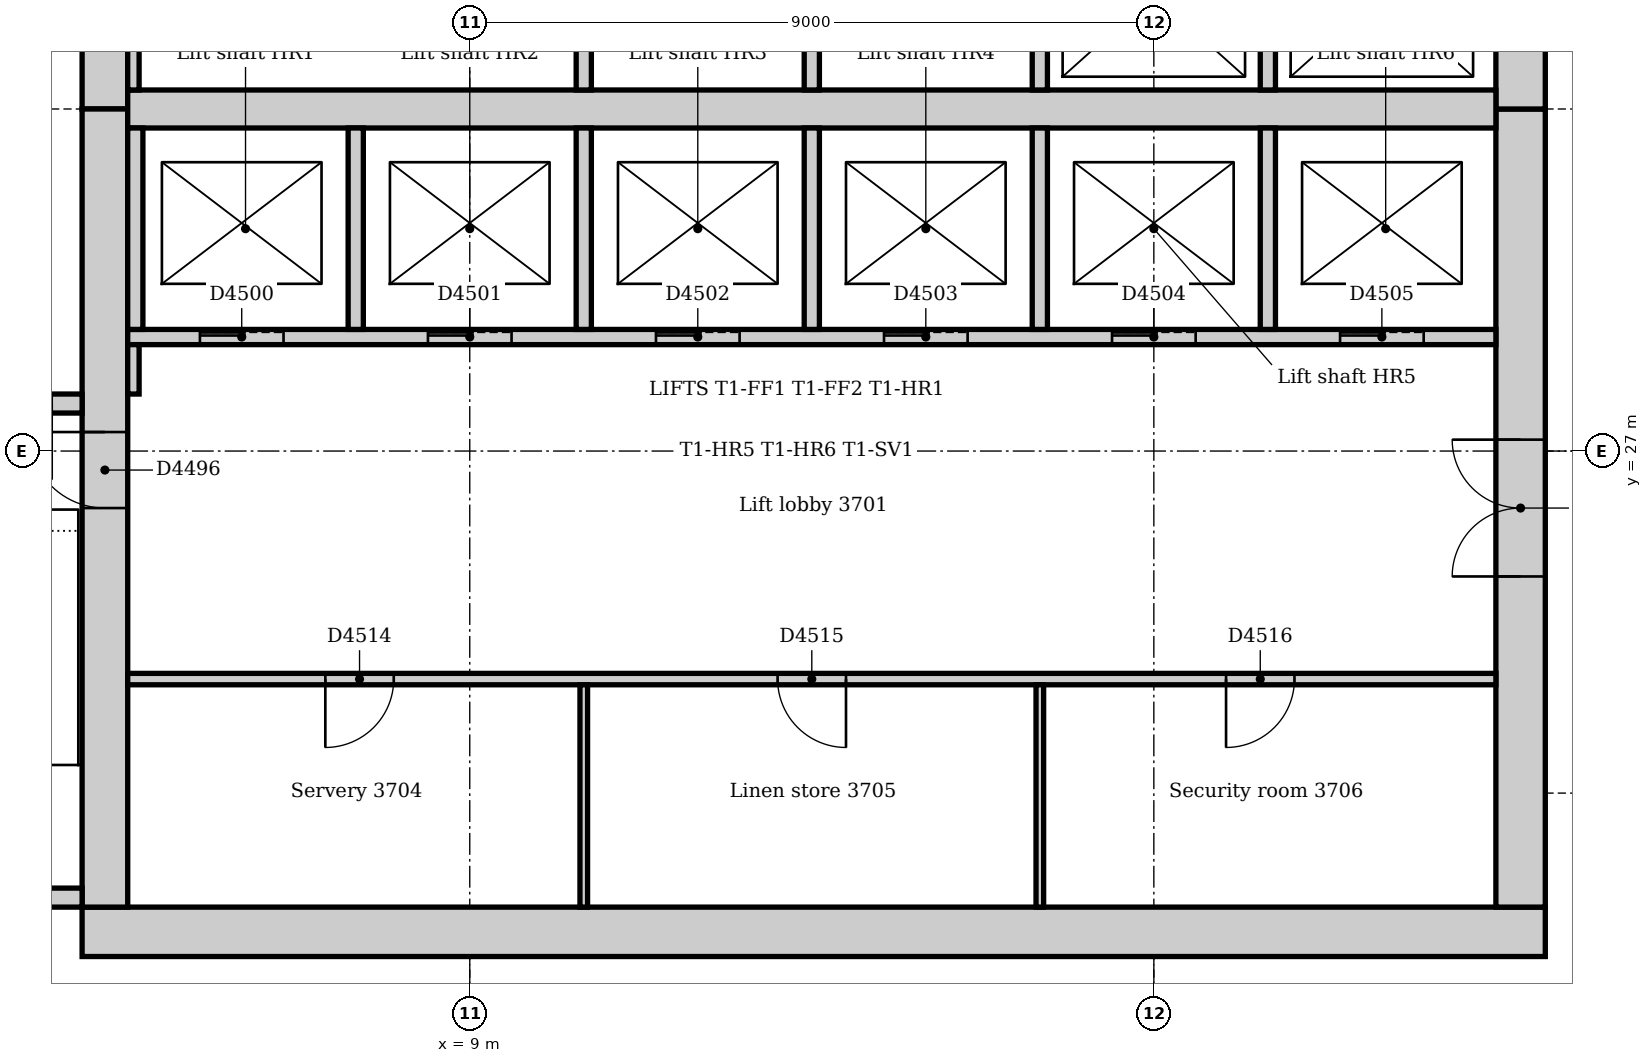
"""IFC4 building model, lengths in metres.
Left out: names, types, materials, properties, quantities, classifications, styles, units other than length and angle.
Written with IfcOpenShell. Run it as: python <this file> out.ifc"""

import sys

from ifc_helpers import new_model, si_unit, direction, frame, frame_2d, origin, place, context, subcontext, project, spatial, rectangle, extrude, element, fill, save


model = new_model("IFC4")
c1 = context("Model", 3, precision=1e-05, world=origin(), true_north=direction((0.0, 1.0)))
c2 = subcontext(c1, "Body", "Model", "MODEL_VIEW")
j1 = project(units=[si_unit("LENGTHUNIT", "METRE"), si_unit("PLANEANGLEUNIT", "RADIAN")], contexts=[c1])
p1 = place(None, origin())
s1 = spatial("IfcSite", under=j1, at=p1, CompositionType="ELEMENT")
p2 = place(p1, origin())
s2 = spatial("IfcBuilding", under=s1, at=p2, CompositionType="ELEMENT")
p3 = place(p2, frame((0.0, 0.0, 157.0)))
s3 = spatial("IfcBuildingStorey", under=s2, at=p3, CompositionType="ELEMENT", Elevation=157.0)
p4 = place(p3, frame((3.9, 20.675, 0.0), z_axis=(0.0, 0.0, 1.0), x_axis=(1.0, 0.0, 0.0)))
e1 = element("IfcWall", 1, at=p4, inside=s3, PredefinedType="SOLIDWALL", context=c2, shape_type="SweptSolid", body=[
    extrude(rectangle(XDim=19.25, YDim=0.65, at=frame_2d((9.625, 0.0))), origin(), (0.0, 0.0, 1.0), 4.0),
])
p5 = place(p3, frame((22.825, 21.0, 0.0), z_axis=(0.0, 0.0, 1.0), x_axis=(0.0, 1.0, 0.0)))
e2 = element("IfcWall", 2, at=p5, inside=s3, PredefinedType="SOLIDWALL", context=c2, shape_type="SweptSolid", body=[
    extrude(rectangle(XDim=10.5, YDim=0.65, at=frame_2d((5.25, 0.0))), origin(), (0.0, 0.0, 1.0), 4.0),
])
p6 = place(p5, frame((4.35, 0.0, 0.0)))
e3 = element("IfcOpeningElement", 3, at=p6, cuts=e2, PredefinedType="OPENING", context=c2, shape_type="SweptSolid", body=[
    extrude(rectangle(XDim=1.8, YDim=2.1, at=frame_2d((0.9, 1.05))), frame((0.0, 0.335, 0.0), z_axis=(0.0, -1.0, 0.0), x_axis=(1.0, 0.0, 0.0)), (0.0, 0.0, 1.0), 0.67),
])
p7 = place(p3, frame((22.825, 31.5, 0.0), z_axis=(0.0, 0.0, 1.0), x_axis=(0.0, 1.0, 0.0)))
e4 = element("IfcWall", 4, at=p7, inside=s3, PredefinedType="SOLIDWALL", context=c2, shape_type="SweptSolid", body=[
    extrude(rectangle(XDim=10.5, YDim=0.65, at=frame_2d((5.25, 0.0))), origin(), (0.0, 0.0, 1.0), 4.0),
])
p8 = place(p7, frame((3.15, 0.0, 0.0)))
e5 = element("IfcOpeningElement", 5, at=p8, cuts=e4, PredefinedType="OPENING", context=c2, shape_type="SweptSolid", body=[
    extrude(rectangle(XDim=1.0, YDim=2.1, at=frame_2d((0.5, 1.05))), frame((0.0, 0.335, 0.0), z_axis=(0.0, -1.0, 0.0), x_axis=(1.0, 0.0, 0.0)), (0.0, 0.0, 1.0), 0.67),
])
p9 = place(p7, frame((5.2, 0.0, 0.0)))
e6 = element("IfcOpeningElement", 6, at=p9, cuts=e4, PredefinedType="OPENING", context=c2, shape_type="SweptSolid", body=[
    extrude(rectangle(XDim=1.0, YDim=2.1, at=frame_2d((0.5, 1.05))), frame((0.0, 0.335, 0.0), z_axis=(0.0, -1.0, 0.0), x_axis=(1.0, 0.0, 0.0)), (0.0, 0.0, 1.0), 0.67),
])
p10 = place(p3, frame((4.2, 42.0, 0.0), z_axis=(0.0, 0.0, 1.0), x_axis=(0.0, -1.0, 0.0)))
e7 = element("IfcWall", 7, at=p10, inside=s3, PredefinedType="SOLIDWALL", context=c2, shape_type="SweptSolid", body=[
    extrude(rectangle(XDim=10.5, YDim=0.6, at=frame_2d((5.25, 0.0))), origin(), (0.0, 0.0, 1.0), 4.0),
])
p11 = place(p10, frame((5.3, 0.0, 0.0)))
e8 = element("IfcOpeningElement", 8, at=p11, cuts=e7, PredefinedType="OPENING", context=c2, shape_type="SweptSolid", body=[
    extrude(rectangle(XDim=1.0, YDim=2.1, at=frame_2d((0.5, 1.05))), frame((0.0, 0.31, 0.0), z_axis=(0.0, -1.0, 0.0), x_axis=(1.0, 0.0, 0.0)), (0.0, 0.0, 1.0), 0.62),
])
p12 = place(p3, frame((4.2, 31.5, 0.0), z_axis=(0.0, 0.0, 1.0), x_axis=(0.0, -1.0, 0.0)))
e9 = element("IfcWall", 9, at=p12, inside=s3, PredefinedType="SOLIDWALL", context=c2, shape_type="SweptSolid", body=[
    extrude(rectangle(XDim=10.5, YDim=0.6, at=frame_2d((5.25, 0.0))), origin(), (0.0, 0.0, 1.0), 4.0),
])
p13 = place(p12, frame((4.25, 0.0, 0.0)))
e10 = element("IfcOpeningElement", 10, at=p13, cuts=e9, PredefinedType="OPENING", context=c2, shape_type="SweptSolid", body=[
    extrude(rectangle(XDim=1.0, YDim=2.1, at=frame_2d((0.5, 1.05))), frame((0.0, 0.31, 0.0), z_axis=(0.0, -1.0, 0.0), x_axis=(1.0, 0.0, 0.0)), (0.0, 0.0, 1.0), 0.62),
])
p14 = place(p3, frame((4.5, 31.5, 0.0), z_axis=(0.0, 0.0, 1.0), x_axis=(1.0, 0.0, 0.0)))
e11 = element("IfcWall", 11, at=p14, inside=s3, PredefinedType="SOLIDWALL", context=c2, shape_type="SweptSolid", body=[
    extrude(rectangle(XDim=18.0, YDim=0.5, at=frame_2d((9.0, 0.0))), origin(), (0.0, 0.0, 1.0), 4.0),
])
p15 = place(p3, frame((0.36, 21.125, 0.0), z_axis=(0.0, 0.0, 1.0), x_axis=(1.0, 0.0, 0.0)))
e12 = element("IfcWall", 12, at=p15, inside=s3, PredefinedType="SOLIDWALL", context=c2, shape_type="SweptSolid", body=[
    extrude(rectangle(XDim=3.54, YDim=0.25, at=frame_2d((1.77, 0.0))), origin(), (0.0, 0.0, 1.0), 4.0),
])
p16 = place(p3, frame((3.9, 27.625, 0.0), z_axis=(0.0, 0.0, 1.0), x_axis=(-1.0, 0.0, 0.0)))
e13 = element("IfcWall", 13, at=p16, inside=s3, PredefinedType="SOLIDWALL", context=c2, shape_type="SweptSolid", body=[
    extrude(rectangle(XDim=3.54, YDim=0.25, at=frame_2d((1.77, 0.0))), origin(), (0.0, 0.0, 1.0), 4.0),
])
p17 = place(p16, frame((0.4, 0.0, 0.0)))
e14 = element("IfcOpeningElement", 14, at=p17, cuts=e13, PredefinedType="OPENING", context=c2, shape_type="SweptSolid", body=[
    extrude(rectangle(XDim=1.0, YDim=2.1, at=frame_2d((0.5, 1.05))), frame((0.0, 0.135, 0.0), z_axis=(0.0, -1.0, 0.0), x_axis=(1.0, 0.0, 0.0)), (0.0, 0.0, 1.0), 0.27),
])
p18 = place(p3, frame((4.5, 28.5, 0.0), z_axis=(0.0, 0.0, 1.0), x_axis=(1.0, 0.0, 0.0)))
e15 = element("IfcWall", 15, at=p18, inside=s3, PredefinedType="PARTITIONING", context=c2, shape_type="SweptSolid", body=[
    extrude(rectangle(XDim=18.0, YDim=0.2, at=frame_2d((9.0, 0.0))), origin(), (0.0, 0.0, 1.0), 3.85),
])
p19 = place(p18, frame((0.95, 0.0, 0.0)))
e16 = element("IfcOpeningElement", 16, at=p19, cuts=e15, PredefinedType="OPENING", context=c2, shape_type="SweptSolid", body=[
    extrude(rectangle(XDim=1.1, YDim=2.1, at=frame_2d((0.55, 1.05))), frame((0.0, 0.11, 0.0), z_axis=(0.0, -1.0, 0.0), x_axis=(1.0, 0.0, 0.0)), (0.0, 0.0, 1.0), 0.22),
])
p20 = place(p18, frame((3.95, 0.0, 0.0)))
e17 = element("IfcOpeningElement", 17, at=p20, cuts=e15, PredefinedType="OPENING", context=c2, shape_type="SweptSolid", body=[
    extrude(rectangle(XDim=1.1, YDim=2.1, at=frame_2d((0.55, 1.05))), frame((0.0, 0.11, 0.0), z_axis=(0.0, -1.0, 0.0), x_axis=(1.0, 0.0, 0.0)), (0.0, 0.0, 1.0), 0.22),
])
p21 = place(p18, frame((6.95, 0.0, 0.0)))
e18 = element("IfcOpeningElement", 18, at=p21, cuts=e15, PredefinedType="OPENING", context=c2, shape_type="SweptSolid", body=[
    extrude(rectangle(XDim=1.1, YDim=2.1, at=frame_2d((0.55, 1.05))), frame((0.0, 0.11, 0.0), z_axis=(0.0, -1.0, 0.0), x_axis=(1.0, 0.0, 0.0)), (0.0, 0.0, 1.0), 0.22),
])
p22 = place(p18, frame((9.95, 0.0, 0.0)))
e19 = element("IfcOpeningElement", 19, at=p22, cuts=e15, PredefinedType="OPENING", context=c2, shape_type="SweptSolid", body=[
    extrude(rectangle(XDim=1.1, YDim=2.1, at=frame_2d((0.55, 1.05))), frame((0.0, 0.11, 0.0), z_axis=(0.0, -1.0, 0.0), x_axis=(1.0, 0.0, 0.0)), (0.0, 0.0, 1.0), 0.22),
])
p23 = place(p18, frame((12.95, 0.0, 0.0)))
e20 = element("IfcOpeningElement", 20, at=p23, cuts=e15, PredefinedType="OPENING", context=c2, shape_type="SweptSolid", body=[
    extrude(rectangle(XDim=1.1, YDim=2.1, at=frame_2d((0.55, 1.05))), frame((0.0, 0.11, 0.0), z_axis=(0.0, -1.0, 0.0), x_axis=(1.0, 0.0, 0.0)), (0.0, 0.0, 1.0), 0.22),
])
p24 = place(p18, frame((15.95, 0.0, 0.0)))
e21 = element("IfcOpeningElement", 21, at=p24, cuts=e15, PredefinedType="OPENING", context=c2, shape_type="SweptSolid", body=[
    extrude(rectangle(XDim=1.1, YDim=2.1, at=frame_2d((0.55, 1.05))), frame((0.0, 0.11, 0.0), z_axis=(0.0, -1.0, 0.0), x_axis=(1.0, 0.0, 0.0)), (0.0, 0.0, 1.0), 0.22),
])
for number, where, z_axis, x_axis in (
    (22, (10.5, 28.6, 0.0), (0.0, 0.0, 1.0), (0.0, 1.0, 0.0)),
    (23, (10.5, 31.75, 0.0), (0.0, 0.0, 1.0), (0.0, 1.0, 0.0)),
    (24, (13.5, 28.6, 0.0), (0.0, 0.0, 1.0), (0.0, 1.0, 0.0)),
    (25, (13.5, 31.75, 0.0), (0.0, 0.0, 1.0), (0.0, 1.0, 0.0)),
    (26, (16.5, 28.6, 0.0), (0.0, 0.0, 1.0), (0.0, 1.0, 0.0)),
    (27, (16.5, 31.75, 0.0), (0.0, 0.0, 1.0), (0.0, 1.0, 0.0)),
    (28, (19.5, 28.6, 0.0), (0.0, 0.0, 1.0), (0.0, 1.0, 0.0)),
    (29, (19.5, 31.75, 0.0), (0.0, 0.0, 1.0), (0.0, 1.0, 0.0)),
    (30, (4.6, 28.6, 0.0), (0.0, 0.0, 1.0), (0.0, 1.0, 0.0)),
    (31, (7.5, 28.6, 0.0), (0.0, 0.0, 1.0), (0.0, 1.0, 0.0)),
):
    element("IfcWall", number, at=place(p3, frame(where, z_axis=z_axis, x_axis=x_axis)), inside=s3, PredefinedType="PARTITIONING", context=c2, shape_type="SweptSolid", body=[
        extrude(rectangle(XDim=2.65, YDim=0.2, at=frame_2d((1.325, 0.0))), origin(), (0.0, 0.0, 1.0), 3.85),
    ])
p25 = place(p3, frame((4.5, 24.0, 0.0), z_axis=(0.0, 0.0, 1.0), x_axis=(1.0, 0.0, 0.0)))
e32 = element("IfcWall", 32, at=p25, inside=s3, PredefinedType="PARTITIONING", context=c2, shape_type="SweptSolid", body=[
    extrude(rectangle(XDim=18.0, YDim=0.15, at=frame_2d((9.0, 0.0))), origin(), (0.0, 0.0, 1.0), 3.85),
])
p26 = place(p25, frame((2.6, 0.0, 0.0)))
e33 = element("IfcOpeningElement", 33, at=p26, cuts=e32, PredefinedType="OPENING", context=c2, shape_type="SweptSolid", body=[
    extrude(rectangle(XDim=0.9, YDim=2.1, at=frame_2d((0.45, 1.05))), frame((0.0, 0.085, 0.0), z_axis=(0.0, -1.0, 0.0), x_axis=(1.0, 0.0, 0.0)), (0.0, 0.0, 1.0), 0.17),
])
p27 = place(p25, frame((8.55, 0.0, 0.0)))
e34 = element("IfcOpeningElement", 34, at=p27, cuts=e32, PredefinedType="OPENING", context=c2, shape_type="SweptSolid", body=[
    extrude(rectangle(XDim=0.9, YDim=2.1, at=frame_2d((0.45, 1.05))), frame((0.0, 0.085, 0.0), z_axis=(0.0, -1.0, 0.0), x_axis=(1.0, 0.0, 0.0)), (0.0, 0.0, 1.0), 0.17),
])
p28 = place(p25, frame((14.45, 0.0, 0.0)))
e35 = element("IfcOpeningElement", 35, at=p28, cuts=e32, PredefinedType="OPENING", context=c2, shape_type="SweptSolid", body=[
    extrude(rectangle(XDim=0.9, YDim=2.1, at=frame_2d((0.45, 1.05))), frame((0.0, 0.085, 0.0), z_axis=(0.0, -1.0, 0.0), x_axis=(1.0, 0.0, 0.0)), (0.0, 0.0, 1.0), 0.17),
])
p29 = place(p3, frame((4.575, 31.75, 0.0), z_axis=(0.0, 0.0, 1.0), x_axis=(0.0, 1.0, 0.0)))
e36 = element("IfcWall", 36, at=p29, inside=s3, PredefinedType="PARTITIONING", context=c2, shape_type="SweptSolid", body=[
    extrude(rectangle(XDim=2.675, YDim=0.15, at=frame_2d((1.337, 0.0))), origin(), (0.0, 0.0, 1.0), 3.85),
])
p30 = place(p3, frame((4.575, 27.75, 0.0), z_axis=(0.0, 0.0, 1.0), x_axis=(0.0, 1.0, 0.0)))
e37 = element("IfcWall", 37, at=p30, inside=s3, PredefinedType="PARTITIONING", context=c2, shape_type="SweptSolid", body=[
    extrude(rectangle(XDim=0.65, YDim=0.15, at=frame_2d((0.325, 0.0))), origin(), (0.0, 0.0, 1.0), 3.85),
])
for number, where, z_axis, x_axis in (
    (38, (10.5, 21.0, 0.0), (0.0, 0.0, 1.0), (0.0, 1.0, 0.0)),
    (39, (16.5, 21.0, 0.0), (0.0, 0.0, 1.0), (0.0, 1.0, 0.0)),
):
    element("IfcWall", number, at=place(p3, frame(where, z_axis=z_axis, x_axis=x_axis)), inside=s3, PredefinedType="PARTITIONING", context=c2, shape_type="SweptSolid", body=[
        extrude(rectangle(XDim=2.925, YDim=0.1, at=frame_2d((1.462, 0.0))), origin(), (0.0, 0.0, 1.0), 3.85),
    ])
p31 = place(p13, frame((1.0, 0.0, 0.0), z_axis=(0.0, 0.0, 1.0), x_axis=(-1.0, 0.0, 0.0)))
e40 = element("IfcDoor", 40, at=p31, inside=s3, OperationType="SINGLE_SWING_RIGHT", PredefinedType="DOOR", context=c2, shape_type="SweptSolid", body=[
    extrude(rectangle(XDim=1.0, YDim=2.1, at=frame_2d((0.5, 1.05))), frame((0.0, 0.025, 0.0), z_axis=(0.0, -1.0, 0.0), x_axis=(1.0, 0.0, 0.0)), (0.0, 0.0, 1.0), 0.05),
])
fill(e10, e40)
p32 = place(p19, origin())
e41 = element("IfcDoor", 41, at=p32, inside=s3, OperationType="SLIDING_TO_LEFT", PredefinedType="DOOR", context=c2, shape_type="SweptSolid", body=[
    extrude(rectangle(XDim=1.1, YDim=2.1, at=frame_2d((0.55, 1.05))), frame((0.0, 0.025, 0.0), z_axis=(0.0, -1.0, 0.0), x_axis=(1.0, 0.0, 0.0)), (0.0, 0.0, 1.0), 0.05),
])
fill(e16, e41)
p33 = place(p20, origin())
e42 = element("IfcDoor", 42, at=p33, inside=s3, OperationType="SLIDING_TO_LEFT", PredefinedType="DOOR", context=c2, shape_type="SweptSolid", body=[
    extrude(rectangle(XDim=1.1, YDim=2.1, at=frame_2d((0.55, 1.05))), frame((0.0, 0.025, 0.0), z_axis=(0.0, -1.0, 0.0), x_axis=(1.0, 0.0, 0.0)), (0.0, 0.0, 1.0), 0.05),
])
fill(e17, e42)
p34 = place(p21, origin())
e43 = element("IfcDoor", 43, at=p34, inside=s3, OperationType="SLIDING_TO_LEFT", PredefinedType="DOOR", context=c2, shape_type="SweptSolid", body=[
    extrude(rectangle(XDim=1.1, YDim=2.1, at=frame_2d((0.55, 1.05))), frame((0.0, 0.025, 0.0), z_axis=(0.0, -1.0, 0.0), x_axis=(1.0, 0.0, 0.0)), (0.0, 0.0, 1.0), 0.05),
])
fill(e18, e43)
p35 = place(p22, origin())
e44 = element("IfcDoor", 44, at=p35, inside=s3, OperationType="SLIDING_TO_LEFT", PredefinedType="DOOR", context=c2, shape_type="SweptSolid", body=[
    extrude(rectangle(XDim=1.1, YDim=2.1, at=frame_2d((0.55, 1.05))), frame((0.0, 0.025, 0.0), z_axis=(0.0, -1.0, 0.0), x_axis=(1.0, 0.0, 0.0)), (0.0, 0.0, 1.0), 0.05),
])
fill(e19, e44)
p36 = place(p23, origin())
e45 = element("IfcDoor", 45, at=p36, inside=s3, OperationType="SLIDING_TO_LEFT", PredefinedType="DOOR", context=c2, shape_type="SweptSolid", body=[
    extrude(rectangle(XDim=1.1, YDim=2.1, at=frame_2d((0.55, 1.05))), frame((0.0, 0.025, 0.0), z_axis=(0.0, -1.0, 0.0), x_axis=(1.0, 0.0, 0.0)), (0.0, 0.0, 1.0), 0.05),
])
fill(e20, e45)
p37 = place(p24, origin())
e46 = element("IfcDoor", 46, at=p37, inside=s3, OperationType="SLIDING_TO_LEFT", PredefinedType="DOOR", context=c2, shape_type="SweptSolid", body=[
    extrude(rectangle(XDim=1.1, YDim=2.1, at=frame_2d((0.55, 1.05))), frame((0.0, 0.025, 0.0), z_axis=(0.0, -1.0, 0.0), x_axis=(1.0, 0.0, 0.0)), (0.0, 0.0, 1.0), 0.05),
])
fill(e21, e46)
p38 = place(p6, origin())
e47 = element("IfcDoor", 47, at=p38, inside=s3, OperationType="DOUBLE_DOOR_DOUBLE_SWING", PredefinedType="DOOR", context=c2, shape_type="SweptSolid", body=[
    extrude(rectangle(XDim=1.8, YDim=2.1, at=frame_2d((0.9, 1.05))), frame((0.0, 0.025, 0.0), z_axis=(0.0, -1.0, 0.0), x_axis=(1.0, 0.0, 0.0)), (0.0, 0.0, 1.0), 0.05),
])
fill(e3, e47)
p39 = place(p26, frame((0.9, 0.0, 0.0), z_axis=(0.0, 0.0, 1.0), x_axis=(-1.0, 0.0, 0.0)))
e48 = element("IfcDoor", 48, at=p39, inside=s3, OperationType="SINGLE_SWING_RIGHT", PredefinedType="DOOR", context=c2, shape_type="SweptSolid", body=[
    extrude(rectangle(XDim=0.9, YDim=2.1, at=frame_2d((0.45, 1.05))), frame((0.0, 0.025, 0.0), z_axis=(0.0, -1.0, 0.0), x_axis=(1.0, 0.0, 0.0)), (0.0, 0.0, 1.0), 0.05),
])
fill(e33, e48)
p40 = place(p27, frame((0.9, 0.0, 0.0), z_axis=(0.0, 0.0, 1.0), x_axis=(-1.0, 0.0, 0.0)))
e49 = element("IfcDoor", 49, at=p40, inside=s3, OperationType="SINGLE_SWING_LEFT", PredefinedType="DOOR", context=c2, shape_type="SweptSolid", body=[
    extrude(rectangle(XDim=0.9, YDim=2.1, at=frame_2d((0.45, 1.05))), frame((0.0, 0.025, 0.0), z_axis=(0.0, -1.0, 0.0), x_axis=(1.0, 0.0, 0.0)), (0.0, 0.0, 1.0), 0.05),
])
fill(e34, e49)
p41 = place(p28, frame((0.9, 0.0, 0.0), z_axis=(0.0, 0.0, 1.0), x_axis=(-1.0, 0.0, 0.0)))
e50 = element("IfcDoor", 50, at=p41, inside=s3, OperationType="SINGLE_SWING_RIGHT", PredefinedType="DOOR", context=c2, shape_type="SweptSolid", body=[
    extrude(rectangle(XDim=0.9, YDim=2.1, at=frame_2d((0.45, 1.05))), frame((0.0, 0.025, 0.0), z_axis=(0.0, -1.0, 0.0), x_axis=(1.0, 0.0, 0.0)), (0.0, 0.0, 1.0), 0.05),
])
fill(e35, e50)
save(model, sys.argv[1])
